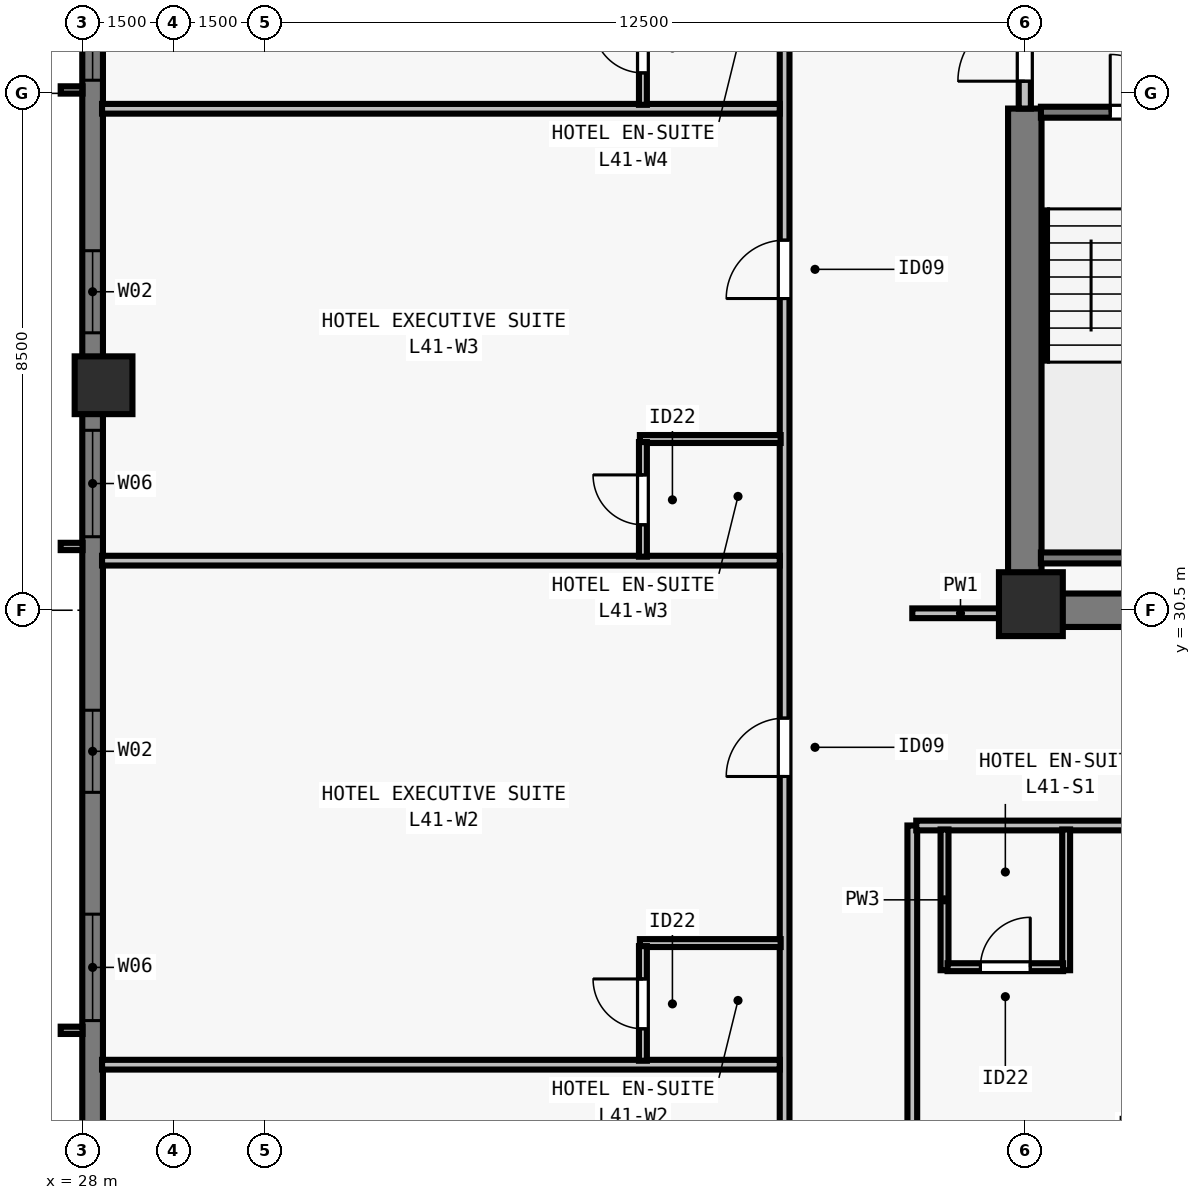
"""IFC4 building model, lengths in metres.
Left out: names, types, materials, properties, quantities, classifications, styles, units other than length and angle.
Written with IfcOpenShell. Run it as: python <this file> out.ifc"""

import sys

from ifc_helpers import new_model, si_unit, direction, frame, frame_2d, origin, origin_2d, place, context, subcontext, project, spatial, rectangle, extrude, element, fill, save


model = new_model("IFC4")
c1 = context("Model", 3, precision=1e-05, world=origin(), true_north=direction((0.0, 1.0)))
c2 = subcontext(c1, "Body", "Model", "MODEL_VIEW")
j1 = project(units=[si_unit("LENGTHUNIT", "METRE"), si_unit("PLANEANGLEUNIT", "RADIAN")], contexts=[c1])
p1 = place(None, origin())
s1 = spatial("IfcSite", under=j1, at=p1, CompositionType="ELEMENT")
p2 = place(p1, origin())
s2 = spatial("IfcBuilding", under=s1, at=p2, CompositionType="ELEMENT")
p3 = place(p2, frame((0.0, 0.0, 151.5)))
s3 = spatial("IfcBuildingStorey", under=s2, at=p3, CompositionType="ELEMENT", Elevation=151.5)
p4 = place(p3, frame((43.6, 30.6, 0.0), z_axis=(0.0, 0.0, 1.0), x_axis=(1.0, 0.0, 0.0)))
e1 = element("IfcColumn", 1, at=p4, inside=s3, PredefinedType="COLUMN", context=c2, shape_type="SweptSolid", body=[
    extrude(rectangle(XDim=1.05, YDim=1.05, at=origin_2d()), origin(), (0.0, 0.0, 1.0), 3.5),
])
p5 = place(p3, frame((28.35, 34.2, 0.0), z_axis=(0.0, 0.0, 1.0), x_axis=(0.0, 1.0, 0.0)))
e2 = element("IfcColumn", 2, at=p5, inside=s3, PredefinedType="COLUMN", context=c2, shape_type="SweptSolid", body=[
    extrude(rectangle(XDim=0.95, YDim=0.95, at=origin_2d()), origin(), (0.0, 0.0, 1.0), 3.5),
])
p6 = place(p3, frame((28.17, 19.0, 0.0), z_axis=(0.0, 0.0, 1.0), x_axis=(0.0, 1.0, 0.0)))
e3 = element("IfcWall", 3, at=p6, inside=s3, PredefinedType="SOLIDWALL", context=c2, shape_type="SweptSolid", body=[
    extrude(rectangle(XDim=39.682, YDim=0.34, at=frame_2d((19.841, 0.0))), origin(), (0.0, 0.0, 1.0), 3.28),
])
p7 = place(p6, frame((4.752, 0.0, 0.8)))
e4 = element("IfcOpeningElement", 4, at=p7, cuts=e3, PredefinedType="OPENING", context=c2, shape_type="SweptSolid", body=[
    extrude(rectangle(XDim=1.75, YDim=1.66, at=frame_2d((0.875, 0.83))), frame((0.0, 0.18, 0.0), z_axis=(0.0, -1.0, 0.0), x_axis=(1.0, 0.0, 0.0)), (0.0, 0.0, 1.0), 0.36),
])
p8 = place(p6, frame((8.505, 0.0, 0.8)))
e5 = element("IfcOpeningElement", 5, at=p8, cuts=e3, PredefinedType="OPENING", context=c2, shape_type="SweptSolid", body=[
    extrude(rectangle(XDim=1.35, YDim=1.66, at=frame_2d((0.675, 0.83))), frame((0.0, 0.18, 0.0), z_axis=(0.0, -1.0, 0.0), x_axis=(1.0, 0.0, 0.0)), (0.0, 0.0, 1.0), 0.36),
])
p9 = place(p6, frame((12.709, 0.0, 0.8)))
e6 = element("IfcOpeningElement", 6, at=p9, cuts=e3, PredefinedType="OPENING", context=c2, shape_type="SweptSolid", body=[
    extrude(rectangle(XDim=1.75, YDim=1.66, at=frame_2d((0.875, 0.83))), frame((0.0, 0.18, 0.0), z_axis=(0.0, -1.0, 0.0), x_axis=(1.0, 0.0, 0.0)), (0.0, 0.0, 1.0), 0.36),
])
p10 = place(p6, frame((16.062, 0.0, 0.8)))
e7 = element("IfcOpeningElement", 7, at=p10, cuts=e3, PredefinedType="OPENING", context=c2, shape_type="SweptSolid", body=[
    extrude(rectangle(XDim=1.35, YDim=1.66, at=frame_2d((0.675, 0.83))), frame((0.0, 0.18, 0.0), z_axis=(0.0, -1.0, 0.0), x_axis=(1.0, 0.0, 0.0)), (0.0, 0.0, 1.0), 0.36),
])
p11 = place(p6, frame((20.216, 0.0, 0.8)))
e8 = element("IfcOpeningElement", 8, at=p11, cuts=e3, PredefinedType="OPENING", context=c2, shape_type="SweptSolid", body=[
    extrude(rectangle(XDim=1.75, YDim=1.66, at=frame_2d((0.875, 0.83))), frame((0.0, 0.18, 0.0), z_axis=(0.0, -1.0, 0.0), x_axis=(1.0, 0.0, 0.0)), (0.0, 0.0, 1.0), 0.36),
])
p12 = place(p6, frame((22.719, 0.0, 0.8)))
e9 = element("IfcOpeningElement", 9, at=p12, cuts=e3, PredefinedType="OPENING", context=c2, shape_type="SweptSolid", body=[
    extrude(rectangle(XDim=1.35, YDim=1.66, at=frame_2d((0.675, 0.83))), frame((0.0, 0.18, 0.0), z_axis=(0.0, -1.0, 0.0), x_axis=(1.0, 0.0, 0.0)), (0.0, 0.0, 1.0), 0.36),
])
p13 = place(p6, frame((25.623, 0.0, 0.8)))
e10 = element("IfcOpeningElement", 10, at=p13, cuts=e3, PredefinedType="OPENING", context=c2, shape_type="SweptSolid", body=[
    extrude(rectangle(XDim=1.75, YDim=1.66, at=frame_2d((0.875, 0.83))), frame((0.0, 0.18, 0.0), z_axis=(0.0, -1.0, 0.0), x_axis=(1.0, 0.0, 0.0)), (0.0, 0.0, 1.0), 0.36),
])
p14 = place(p6, frame((29.827, 0.0, 0.8)))
e11 = element("IfcOpeningElement", 11, at=p14, cuts=e3, PredefinedType="OPENING", context=c2, shape_type="SweptSolid", body=[
    extrude(rectangle(XDim=1.35, YDim=1.66, at=frame_2d((0.675, 0.83))), frame((0.0, 0.18, 0.0), z_axis=(0.0, -1.0, 0.0), x_axis=(1.0, 0.0, 0.0)), (0.0, 0.0, 1.0), 0.36),
])
p15 = place(p6, frame((33.18, 0.0, 0.8)))
e12 = element("IfcOpeningElement", 12, at=p15, cuts=e3, PredefinedType="OPENING", context=c2, shape_type="SweptSolid", body=[
    extrude(rectangle(XDim=1.75, YDim=1.66, at=frame_2d((0.875, 0.83))), frame((0.0, 0.18, 0.0), z_axis=(0.0, -1.0, 0.0), x_axis=(1.0, 0.0, 0.0)), (0.0, 0.0, 1.0), 0.36),
])
p16 = place(p3, frame((43.225, 30.5, 0.0), z_axis=(0.0, 0.0, 1.0), x_axis=(1.0, 0.0, 0.0)))
e13 = element("IfcWall", 13, at=p16, inside=s3, PredefinedType="SHEAR", context=c2, shape_type="SweptSolid", body=[
    extrude(rectangle(XDim=17.55, YDim=0.55, at=frame_2d((8.775, 0.0))), origin(), (0.0, 0.0, 1.0), 3.28),
])
p17 = place(p3, frame((43.5, 30.765, 0.0), z_axis=(0.0, 0.0, 1.0), x_axis=(0.0, 1.0, 0.0)))
e14 = element("IfcWall", 14, at=p17, inside=s3, PredefinedType="SHEAR", context=c2, shape_type="SweptSolid", body=[
    extrude(rectangle(XDim=7.985, YDim=0.55, at=frame_2d((3.993, 0.0))), origin(), (0.0, 0.0, 1.0), 3.28),
])
p18 = place(p3, frame((43.5, 38.75, 0.0), z_axis=(0.0, 0.0, 1.0), x_axis=(0.0, 1.0, 0.0)))
e15 = element("IfcWall", 15, at=p18, inside=s3, PredefinedType="SOLIDWALL", context=c2, shape_type="SweptSolid", body=[
    extrude(rectangle(XDim=2.05, YDim=0.2, at=frame_2d((1.025, 0.0))), origin(), (0.0, 0.0, 1.0), 3.28),
])
p19 = place(p18, frame((0.45, 0.0, 0.0)))
e16 = element("IfcOpeningElement", 16, at=p19, cuts=e15, PredefinedType="OPENING", context=c2, shape_type="SweptSolid", body=[
    extrude(rectangle(XDim=1.1, YDim=2.15, at=frame_2d((0.55, 1.075))), frame((0.0, 0.11, 0.0), z_axis=(0.0, -1.0, 0.0), x_axis=(1.0, 0.0, 0.0)), (0.0, 0.0, 1.0), 0.22),
])
p20 = place(p3, frame((39.55, 15.325, 0.0), z_axis=(0.0, 0.0, 1.0), x_axis=(0.0, 1.0, 0.0)))
e17 = element("IfcWall", 17, at=p20, inside=s3, PredefinedType="PARTITIONING", context=c2, shape_type="SweptSolid", body=[
    extrude(rectangle(XDim=47.35, YDim=0.16, at=frame_2d((23.675, 0.0))), origin(), (0.0, 0.0, 1.0), 2.555),
])
p21 = place(p20, frame((4.718, 0.0, 0.0)))
e18 = element("IfcOpeningElement", 18, at=p21, cuts=e17, PredefinedType="OPENING", context=c2, shape_type="SweptSolid", body=[
    extrude(rectangle(XDim=0.96, YDim=2.15, at=frame_2d((0.48, 1.075))), frame((0.0, 0.09, 0.0), z_axis=(0.0, -1.0, 0.0), x_axis=(1.0, 0.0, 0.0)), (0.0, 0.0, 1.0), 0.18),
])
p22 = place(p20, frame((12.441, 0.0, 0.0)))
e19 = element("IfcOpeningElement", 19, at=p22, cuts=e17, PredefinedType="OPENING", context=c2, shape_type="SweptSolid", body=[
    extrude(rectangle(XDim=0.96, YDim=2.15, at=frame_2d((0.48, 1.075))), frame((0.0, 0.09, 0.0), z_axis=(0.0, -1.0, 0.0), x_axis=(1.0, 0.0, 0.0)), (0.0, 0.0, 1.0), 0.18),
])
p23 = place(p20, frame((20.301, 0.0, 0.0)))
e20 = element("IfcOpeningElement", 20, at=p23, cuts=e17, PredefinedType="OPENING", context=c2, shape_type="SweptSolid", body=[
    extrude(rectangle(XDim=0.96, YDim=2.15, at=frame_2d((0.48, 1.075))), frame((0.0, 0.09, 0.0), z_axis=(0.0, -1.0, 0.0), x_axis=(1.0, 0.0, 0.0)), (0.0, 0.0, 1.0), 0.18),
])
p24 = place(p20, frame((28.161, 0.0, 0.0)))
e21 = element("IfcOpeningElement", 21, at=p24, cuts=e17, PredefinedType="OPENING", context=c2, shape_type="SweptSolid", body=[
    extrude(rectangle(XDim=0.96, YDim=2.15, at=frame_2d((0.48, 1.075))), frame((0.0, 0.09, 0.0), z_axis=(0.0, -1.0, 0.0), x_axis=(1.0, 0.0, 0.0)), (0.0, 0.0, 1.0), 0.18),
])
p25 = place(p20, frame((36.021, 0.0, 0.0)))
e22 = element("IfcOpeningElement", 22, at=p25, cuts=e17, PredefinedType="OPENING", context=c2, shape_type="SweptSolid", body=[
    extrude(rectangle(XDim=0.96, YDim=2.15, at=frame_2d((0.48, 1.075))), frame((0.0, 0.09, 0.0), z_axis=(0.0, -1.0, 0.0), x_axis=(1.0, 0.0, 0.0)), (0.0, 0.0, 1.0), 0.18),
])
p26 = place(p20, frame((43.793, 0.0, 0.0)))
e23 = element("IfcOpeningElement", 23, at=p26, cuts=e17, PredefinedType="OPENING", context=c2, shape_type="SweptSolid", body=[
    extrude(rectangle(XDim=0.96, YDim=2.15, at=frame_2d((0.48, 1.075))), frame((0.0, 0.09, 0.0), z_axis=(0.0, -1.0, 0.0), x_axis=(1.0, 0.0, 0.0)), (0.0, 0.0, 1.0), 0.18),
])
p27 = place(p3, frame((41.65, 15.325, 0.0), z_axis=(0.0, 0.0, 1.0), x_axis=(0.0, 1.0, 0.0)))
e24 = element("IfcWall", 24, at=p27, inside=s3, PredefinedType="PARTITIONING", context=c2, shape_type="SweptSolid", body=[
    extrude(rectangle(XDim=11.635, YDim=0.16, at=frame_2d((5.817, 0.0))), origin(), (0.0, 0.0, 1.0), 3.28),
])
p28 = place(p3, frame((41.65, 30.45, 0.0), z_axis=(0.0, 0.0, 1.0), x_axis=(1.0, 0.0, 0.0)))
e25 = element("IfcWall", 25, at=p28, inside=s3, PredefinedType="PARTITIONING", context=c2, shape_type="SweptSolid", body=[
    extrude(rectangle(XDim=1.585, YDim=0.16, at=frame_2d((0.792, 0.0))), origin(), (0.0, 0.0, 1.0), 3.28),
])
p29 = place(p3, frame((41.715, 26.96, 0.0), z_axis=(0.0, 0.0, 1.0), x_axis=(1.0, 0.0, 0.0)))
e26 = element("IfcWall", 26, at=p29, inside=s3, PredefinedType="PARTITIONING", context=c2, shape_type="SweptSolid", body=[
    extrude(rectangle(XDim=22.07, YDim=0.16, at=frame_2d((11.035, 0.0))), origin(), (0.0, 0.0, 1.0), 3.28),
])
p30 = place(p29, frame((6.15, 0.0, 0.0)))
e27 = element("IfcOpeningElement", 27, at=p30, cuts=e26, PredefinedType="OPENING", context=c2, shape_type="SweptSolid", body=[
    extrude(rectangle(XDim=0.96, YDim=2.15, at=frame_2d((0.48, 1.075))), frame((0.0, 0.09, 0.0), z_axis=(0.0, -1.0, 0.0), x_axis=(1.0, 0.0, 0.0)), (0.0, 0.0, 1.0), 0.18),
])
p31 = place(p29, frame((16.945, 0.0, 0.0)))
e28 = element("IfcOpeningElement", 28, at=p31, cuts=e26, PredefinedType="OPENING", context=c2, shape_type="SweptSolid", body=[
    extrude(rectangle(XDim=0.96, YDim=2.15, at=frame_2d((0.48, 1.075))), frame((0.0, 0.09, 0.0), z_axis=(0.0, -1.0, 0.0), x_axis=(1.0, 0.0, 0.0)), (0.0, 0.0, 1.0), 0.18),
])
for number, where, z_axis, x_axis in (
    (29, (42.18, 24.58, 0.0), (0.0, 0.0, 1.0), (0.0, 1.0, 0.0)),
    (30, (44.18, 24.58, 0.0), (0.0, 0.0, 1.0), (0.0, 1.0, 0.0)),
):
    element("IfcWall", number, at=place(p3, frame(where, z_axis=z_axis, x_axis=x_axis)), inside=s3, PredefinedType="PLUMBINGWALL", context=c2, shape_type="SweptSolid", body=[
        extrude(rectangle(XDim=2.315, YDim=0.13, at=frame_2d((1.157, 0.0))), origin(), (0.0, 0.0, 1.0), 3.28),
    ])
p32 = place(p3, frame((42.23, 24.63, 0.0), z_axis=(0.0, 0.0, 1.0), x_axis=(1.0, 0.0, 0.0)))
e31 = element("IfcWall", 31, at=p32, inside=s3, PredefinedType="PLUMBINGWALL", context=c2, shape_type="SweptSolid", body=[
    extrude(rectangle(XDim=1.9, YDim=0.13, at=frame_2d((0.95, 0.0))), origin(), (0.0, 0.0, 1.0), 3.28),
])
p33 = place(p32, frame((0.54, 0.0, 0.0)))
e32 = element("IfcOpeningElement", 32, at=p33, cuts=e31, PredefinedType="OPENING", context=c2, shape_type="SweptSolid", body=[
    extrude(rectangle(XDim=0.82, YDim=2.1, at=frame_2d((0.41, 1.05))), frame((0.0, 0.075, 0.0), z_axis=(0.0, -1.0, 0.0), x_axis=(1.0, 0.0, 0.0)), (0.0, 0.0, 1.0), 0.15),
])
p34 = place(p3, frame((28.325, 23.027, 0.0), z_axis=(0.0, 0.0, 1.0), x_axis=(1.0, 0.0, 0.0)))
e33 = element("IfcWall", 33, at=p34, inside=s3, PredefinedType="PARTITIONING", context=c2, shape_type="SweptSolid", body=[
    extrude(rectangle(XDim=11.145, YDim=0.16, at=frame_2d((5.573, 0.0))), origin(), (0.0, 0.0, 1.0), 2.896),
])
p35 = place(p3, frame((37.17, 25.027, 0.0), z_axis=(0.0, 0.0, 1.0), x_axis=(1.0, 0.0, 0.0)))
e34 = element("IfcWall", 34, at=p35, inside=s3, PredefinedType="PLUMBINGWALL", context=c2, shape_type="SweptSolid", body=[
    extrude(rectangle(XDim=2.315, YDim=0.13, at=frame_2d((1.158, 0.0))), origin(), (0.0, 0.0, 1.0), 3.28),
])
p36 = place(p3, frame((37.22, 23.092, 0.0), z_axis=(0.0, 0.0, 1.0), x_axis=(0.0, 1.0, 0.0)))
e35 = element("IfcWall", 35, at=p36, inside=s3, PredefinedType="PLUMBINGWALL", context=c2, shape_type="SweptSolid", body=[
    extrude(rectangle(XDim=1.885, YDim=0.13, at=frame_2d((0.942, 0.0))), origin(), (0.0, 0.0, 1.0), 3.28),
])
p37 = place(p36, frame((0.525, 0.0, 0.0)))
e36 = element("IfcOpeningElement", 36, at=p37, cuts=e35, PredefinedType="OPENING", context=c2, shape_type="SweptSolid", body=[
    extrude(rectangle(XDim=0.82, YDim=2.1, at=frame_2d((0.41, 1.05))), frame((0.0, 0.075, 0.0), z_axis=(0.0, -1.0, 0.0), x_axis=(1.0, 0.0, 0.0)), (0.0, 0.0, 1.0), 0.15),
])
p38 = place(p3, frame((28.325, 31.315, 0.0), z_axis=(0.0, 0.0, 1.0), x_axis=(1.0, 0.0, 0.0)))
e37 = element("IfcWall", 37, at=p38, inside=s3, PredefinedType="PARTITIONING", context=c2, shape_type="SweptSolid", body=[
    extrude(rectangle(XDim=11.145, YDim=0.16, at=frame_2d((5.573, 0.0))), origin(), (0.0, 0.0, 1.0), 3.28),
])
p39 = place(p3, frame((37.17, 33.315, 0.0), z_axis=(0.0, 0.0, 1.0), x_axis=(1.0, 0.0, 0.0)))
e38 = element("IfcWall", 38, at=p39, inside=s3, PredefinedType="PLUMBINGWALL", context=c2, shape_type="SweptSolid", body=[
    extrude(rectangle(XDim=2.315, YDim=0.13, at=frame_2d((1.158, 0.0))), origin(), (0.0, 0.0, 1.0), 3.28),
])
p40 = place(p3, frame((37.22, 31.381, 0.0), z_axis=(0.0, 0.0, 1.0), x_axis=(0.0, 1.0, 0.0)))
e39 = element("IfcWall", 39, at=p40, inside=s3, PredefinedType="PLUMBINGWALL", context=c2, shape_type="SweptSolid", body=[
    extrude(rectangle(XDim=1.885, YDim=0.13, at=frame_2d((0.942, 0.0))), origin(), (0.0, 0.0, 1.0), 3.28),
])
p41 = place(p40, frame((0.525, 0.0, 0.0)))
e40 = element("IfcOpeningElement", 40, at=p41, cuts=e39, PredefinedType="OPENING", context=c2, shape_type="SweptSolid", body=[
    extrude(rectangle(XDim=0.82, YDim=2.1, at=frame_2d((0.41, 1.05))), frame((0.0, 0.075, 0.0), z_axis=(0.0, -1.0, 0.0), x_axis=(1.0, 0.0, 0.0)), (0.0, 0.0, 1.0), 0.15),
])
p42 = place(p3, frame((28.325, 38.747, 0.0), z_axis=(0.0, 0.0, 1.0), x_axis=(1.0, 0.0, 0.0)))
e41 = element("IfcWall", 41, at=p42, inside=s3, PredefinedType="PARTITIONING", context=c2, shape_type="SweptSolid", body=[
    extrude(rectangle(XDim=11.145, YDim=0.16, at=frame_2d((5.573, 0.0))), origin(), (0.0, 0.0, 1.0), 2.896),
])
p43 = place(p3, frame((37.22, 38.812, 0.0), z_axis=(0.0, 0.0, 1.0), x_axis=(0.0, 1.0, 0.0)))
e42 = element("IfcWall", 42, at=p43, inside=s3, PredefinedType="PLUMBINGWALL", context=c2, shape_type="SweptSolid", body=[
    extrude(rectangle(XDim=1.885, YDim=0.13, at=frame_2d((0.942, 0.0))), origin(), (0.0, 0.0, 1.0), 3.28),
])
p44 = place(p43, frame((0.525, 0.0, 0.0)))
e43 = element("IfcOpeningElement", 43, at=p44, cuts=e42, PredefinedType="OPENING", context=c2, shape_type="SweptSolid", body=[
    extrude(rectangle(XDim=0.82, YDim=2.1, at=frame_2d((0.41, 1.05))), frame((0.0, 0.075, 0.0), z_axis=(0.0, -1.0, 0.0), x_axis=(1.0, 0.0, 0.0)), (0.0, 0.0, 1.0), 0.15),
])
p45 = place(p3, frame((43.765, 38.69, 0.0), z_axis=(0.0, 0.0, 1.0), x_axis=(1.0, 0.0, 0.0)))
e44 = element("IfcWall", 44, at=p45, inside=s3, PredefinedType="SOLIDWALL", context=c2, shape_type="SweptSolid", body=[
    extrude(rectangle(XDim=3.23, YDim=0.18, at=frame_2d((1.615, 0.0))), origin(), (0.0, 0.0, 1.0), 3.28),
])
p46 = place(p45, frame((1.14, 0.0, 0.0)))
e45 = element("IfcOpeningElement", 45, at=p46, cuts=e44, PredefinedType="OPENING", context=c2, shape_type="SweptSolid", body=[
    extrude(rectangle(XDim=0.95, YDim=2.15, at=frame_2d((0.475, 1.075))), frame((0.0, 0.1, 0.0), z_axis=(0.0, -1.0, 0.0), x_axis=(1.0, 0.0, 0.0)), (0.0, 0.0, 1.0), 0.2),
])
p47 = place(p3, frame((43.765, 31.36, 0.0), z_axis=(0.0, 0.0, 1.0), x_axis=(1.0, 0.0, 0.0)))
e46 = element("IfcWall", 46, at=p47, inside=s3, PredefinedType="SOLIDWALL", context=c2, shape_type="SweptSolid", body=[
    extrude(rectangle(XDim=3.23, YDim=0.18, at=frame_2d((1.615, 0.0))), origin(), (0.0, 0.0, 1.0), 3.28),
])
p48 = place(p7, origin())
e47 = element("IfcWindow", 47, at=p48, inside=s3, PartitioningType="SINGLE_PANEL", PredefinedType="WINDOW", context=c2, shape_type="SweptSolid", body=[
    extrude(rectangle(XDim=1.75, YDim=1.66, at=frame_2d((0.875, 0.83))), frame((0.0, -0.05, 0.0), z_axis=(0.0, -1.0, 0.0), x_axis=(1.0, 0.0, 0.0)), (0.0, 0.0, 1.0), 0.06),
])
fill(e4, e47)
p49 = place(p8, origin())
e48 = element("IfcWindow", 48, at=p49, inside=s3, PartitioningType="SINGLE_PANEL", PredefinedType="WINDOW", context=c2, shape_type="SweptSolid", body=[
    extrude(rectangle(XDim=1.35, YDim=1.66, at=frame_2d((0.675, 0.83))), frame((0.0, -0.05, 0.0), z_axis=(0.0, -1.0, 0.0), x_axis=(1.0, 0.0, 0.0)), (0.0, 0.0, 1.0), 0.06),
])
fill(e5, e48)
p50 = place(p9, origin())
e49 = element("IfcWindow", 49, at=p50, inside=s3, PartitioningType="SINGLE_PANEL", PredefinedType="WINDOW", context=c2, shape_type="SweptSolid", body=[
    extrude(rectangle(XDim=1.75, YDim=1.66, at=frame_2d((0.875, 0.83))), frame((0.0, -0.05, 0.0), z_axis=(0.0, -1.0, 0.0), x_axis=(1.0, 0.0, 0.0)), (0.0, 0.0, 1.0), 0.06),
])
fill(e6, e49)
p51 = place(p10, origin())
e50 = element("IfcWindow", 50, at=p51, inside=s3, PartitioningType="SINGLE_PANEL", PredefinedType="WINDOW", context=c2, shape_type="SweptSolid", body=[
    extrude(rectangle(XDim=1.35, YDim=1.66, at=frame_2d((0.675, 0.83))), frame((0.0, -0.05, 0.0), z_axis=(0.0, -1.0, 0.0), x_axis=(1.0, 0.0, 0.0)), (0.0, 0.0, 1.0), 0.06),
])
fill(e7, e50)
p52 = place(p11, origin())
e51 = element("IfcWindow", 51, at=p52, inside=s3, PartitioningType="SINGLE_PANEL", PredefinedType="WINDOW", context=c2, shape_type="SweptSolid", body=[
    extrude(rectangle(XDim=1.75, YDim=1.66, at=frame_2d((0.875, 0.83))), frame((0.0, -0.05, 0.0), z_axis=(0.0, -1.0, 0.0), x_axis=(1.0, 0.0, 0.0)), (0.0, 0.0, 1.0), 0.06),
])
fill(e8, e51)
p53 = place(p19, origin())
e52 = element("IfcDoor", 52, at=p53, inside=s3, OperationType="SINGLE_SWING_LEFT", PredefinedType="DOOR", context=c2, shape_type="SweptSolid", body=[
    extrude(rectangle(XDim=1.1, YDim=2.15, at=frame_2d((0.55, 1.075))), frame((0.0, 0.025, 0.0), z_axis=(0.0, -1.0, 0.0), x_axis=(1.0, 0.0, 0.0)), (0.0, 0.0, 1.0), 0.05),
])
fill(e16, e52)
p54 = place(p33, origin())
e53 = element("IfcDoor", 53, at=p54, inside=s3, OperationType="SINGLE_SWING_RIGHT", PredefinedType="DOOR", context=c2, shape_type="SweptSolid", body=[
    extrude(rectangle(XDim=0.82, YDim=2.1, at=frame_2d((0.41, 1.05))), frame((0.0, 0.025, 0.0), z_axis=(0.0, -1.0, 0.0), x_axis=(1.0, 0.0, 0.0)), (0.0, 0.0, 1.0), 0.05),
])
fill(e32, e53)
p55 = place(p37, origin())
e54 = element("IfcDoor", 54, at=p55, inside=s3, OperationType="SINGLE_SWING_RIGHT", PredefinedType="DOOR", context=c2, shape_type="SweptSolid", body=[
    extrude(rectangle(XDim=0.82, YDim=2.1, at=frame_2d((0.41, 1.05))), frame((0.0, 0.025, 0.0), z_axis=(0.0, -1.0, 0.0), x_axis=(1.0, 0.0, 0.0)), (0.0, 0.0, 1.0), 0.05),
])
fill(e36, e54)
p56 = place(p22, origin())
e55 = element("IfcDoor", 55, at=p56, inside=s3, OperationType="SINGLE_SWING_LEFT", PredefinedType="DOOR", context=c2, shape_type="SweptSolid", body=[
    extrude(rectangle(XDim=0.96, YDim=2.15, at=frame_2d((0.48, 1.075))), frame((0.0, 0.025, 0.0), z_axis=(0.0, -1.0, 0.0), x_axis=(1.0, 0.0, 0.0)), (0.0, 0.0, 1.0), 0.05),
])
fill(e19, e55)
p57 = place(p41, origin())
e56 = element("IfcDoor", 56, at=p57, inside=s3, OperationType="SINGLE_SWING_RIGHT", PredefinedType="DOOR", context=c2, shape_type="SweptSolid", body=[
    extrude(rectangle(XDim=0.82, YDim=2.1, at=frame_2d((0.41, 1.05))), frame((0.0, 0.025, 0.0), z_axis=(0.0, -1.0, 0.0), x_axis=(1.0, 0.0, 0.0)), (0.0, 0.0, 1.0), 0.05),
])
fill(e40, e56)
p58 = place(p23, origin())
e57 = element("IfcDoor", 57, at=p58, inside=s3, OperationType="SINGLE_SWING_LEFT", PredefinedType="DOOR", context=c2, shape_type="SweptSolid", body=[
    extrude(rectangle(XDim=0.96, YDim=2.15, at=frame_2d((0.48, 1.075))), frame((0.0, 0.025, 0.0), z_axis=(0.0, -1.0, 0.0), x_axis=(1.0, 0.0, 0.0)), (0.0, 0.0, 1.0), 0.05),
])
fill(e20, e57)
p59 = place(p44, origin())
e58 = element("IfcDoor", 58, at=p59, inside=s3, OperationType="SINGLE_SWING_RIGHT", PredefinedType="DOOR", context=c2, shape_type="SweptSolid", body=[
    extrude(rectangle(XDim=0.82, YDim=2.1, at=frame_2d((0.41, 1.05))), frame((0.0, 0.025, 0.0), z_axis=(0.0, -1.0, 0.0), x_axis=(1.0, 0.0, 0.0)), (0.0, 0.0, 1.0), 0.05),
])
fill(e43, e58)
p60 = place(p46, origin())
e59 = element("IfcDoor", 59, at=p60, inside=s3, OperationType="SINGLE_SWING_LEFT", PredefinedType="DOOR", context=c2, shape_type="SweptSolid", body=[
    extrude(rectangle(XDim=0.95, YDim=2.15, at=frame_2d((0.475, 1.075))), frame((0.0, 0.025, 0.0), z_axis=(0.0, -1.0, 0.0), x_axis=(1.0, 0.0, 0.0)), (0.0, 0.0, 1.0), 0.05),
])
fill(e45, e59)
save(model, sys.argv[1])
